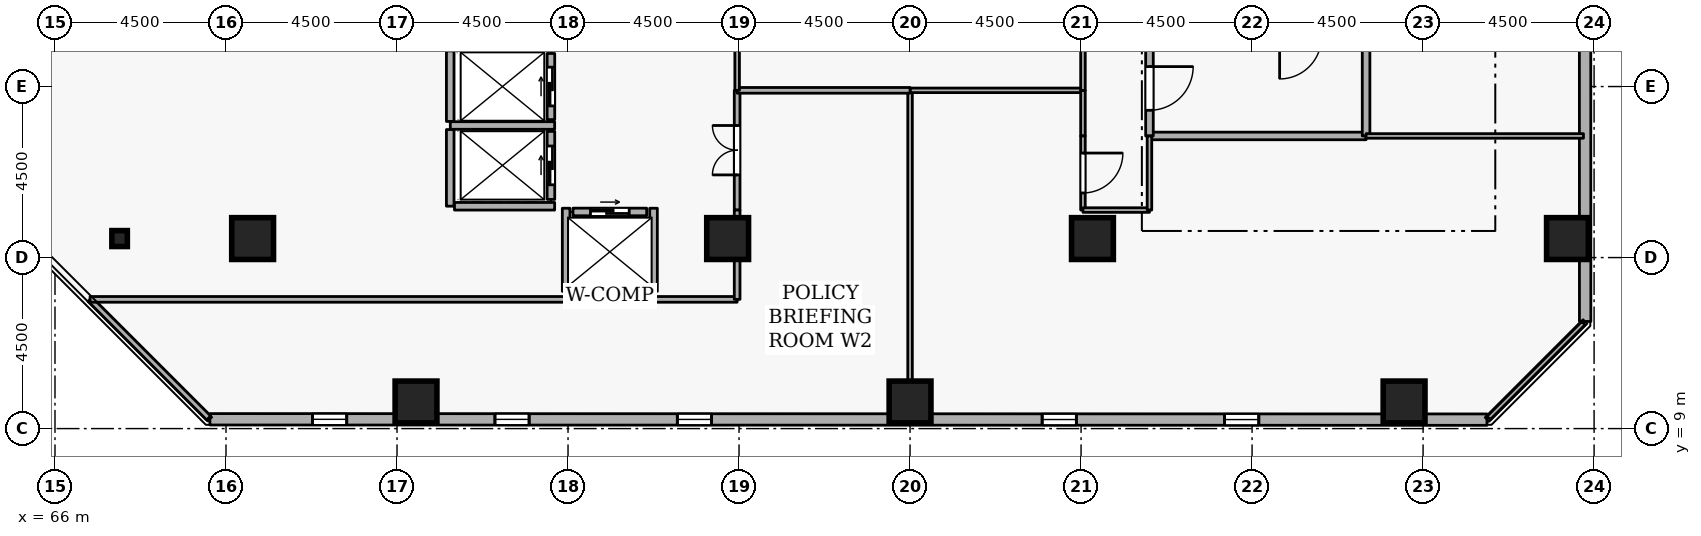
"""IFC4 building model, lengths in metres.
Left out: names, types, materials, properties, quantities, classifications, styles, units other than length and angle.
Written with IfcOpenShell. Run it as: python <this file> out.ifc"""

import sys

from ifc_helpers import new_model, si_unit, direction, frame, frame_2d, origin, origin_2d, place, context, subcontext, project, spatial, rectangle, i_section, extrude, element, fill, save


model = new_model("IFC4")
c1 = context("Model", 3, precision=1e-05, world=origin(), true_north=direction((0.0, 1.0)))
c2 = subcontext(c1, "Body", "Model", "MODEL_VIEW")
j1 = project(units=[si_unit("LENGTHUNIT", "METRE"), si_unit("PLANEANGLEUNIT", "RADIAN")], contexts=[c1])
p1 = place(None, origin())
s1 = spatial("IfcSite", under=j1, at=p1, CompositionType="ELEMENT")
p2 = place(p1, origin())
s2 = spatial("IfcBuilding", under=s1, at=p2, CompositionType="ELEMENT")
p3 = place(p2, frame((0.0, 0.0, 185.7)))
s3 = spatial("IfcBuildingStorey", under=s2, at=p3, CompositionType="ELEMENT", Elevation=185.7)
for number, where, z_axis, x_axis in (
    (1, (105.8, 14.0, 0.0), (0.0, 0.0, 1.0), (1.0, 0.0, 0.0)),
    (2, (71.2, 14.0, 0.0), (0.0, 0.0, 1.0), (1.0, 0.0, 0.0)),
    (3, (101.5, 9.7, 0.0), (0.0, 0.0, 1.0), (1.0, 0.0, 0.0)),
    (4, (88.5, 9.7, 0.0), (0.0, 0.0, 1.0), (1.0, 0.0, 0.0)),
    (5, (75.5, 9.7, 0.0), (0.0, 0.0, 1.0), (1.0, 0.0, 0.0)),
    (6, (93.3, 14.0, 0.0), (0.0, 0.0, 1.0), (1.0, 0.0, 0.0)),
    (7, (83.7, 14.0, 0.0), (0.0, 0.0, 1.0), (1.0, 0.0, 0.0)),
):
    element("IfcColumn", number, at=place(p3, frame(where, z_axis=z_axis, x_axis=x_axis)), inside=s3, PredefinedType="COLUMN", context=c2, shape_type="SweptSolid", body=[
        extrude(rectangle(XDim=1.1, YDim=1.1, at=origin_2d()), origin(), (0.0, 0.0, 1.0), 3.6),
    ])
p4 = place(p3, frame((67.7, 14.0, 0.0), z_axis=(0.0, 0.0, 1.0), x_axis=(1.0, 0.0, 0.0)))
e8 = element("IfcColumn", 8, at=p4, inside=s3, PredefinedType="COLUMN", context=c2, shape_type="SweptSolid", body=[
    extrude(i_section(OverallWidth=0.407, OverallDepth=0.419, WebThickness=0.031, FlangeThickness=0.049, FilletRadius=0.015, at=origin_2d()), origin(), (0.0, 0.0, 1.0), 3.6),
])
p5 = place(p3, frame((70.076, 9.244, 0.0), z_axis=(0.0, 0.0, 1.0), x_axis=(0.999999963872, -0.000268805477, 0.0)))
e9 = element("IfcWall", 9, at=p5, inside=s3, PredefinedType="STANDARD", context=c2, shape_type="SweptSolid", body=[
    extrude(rectangle(XDim=33.605, YDim=0.3, at=frame_2d((16.802, 0.0))), origin(), (0.0, 0.0, 1.0), 2.7),
])
p6 = place(p5, frame((2.7, 0.0, 0.72)))
e10 = element("IfcOpeningElement", 10, at=p6, cuts=e9, PredefinedType="OPENING", context=c2, shape_type="SweptSolid", body=[
    extrude(rectangle(XDim=0.9, YDim=1.75, at=frame_2d((0.45, 0.875))), frame((0.0, 0.16, 0.0), z_axis=(0.0, -1.0, 0.0), x_axis=(1.0, 0.0, 0.0)), (0.0, 0.0, 1.0), 0.32),
])
p7 = place(p5, frame((7.5, 0.0, 0.72)))
e11 = element("IfcOpeningElement", 11, at=p7, cuts=e9, PredefinedType="OPENING", context=c2, shape_type="SweptSolid", body=[
    extrude(rectangle(XDim=0.9, YDim=1.75, at=frame_2d((0.45, 0.875))), frame((0.0, 0.16, 0.0), z_axis=(0.0, -1.0, 0.0), x_axis=(1.0, 0.0, 0.0)), (0.0, 0.0, 1.0), 0.32),
])
p8 = place(p5, frame((12.3, 0.0, 0.72)))
e12 = element("IfcOpeningElement", 12, at=p8, cuts=e9, PredefinedType="OPENING", context=c2, shape_type="SweptSolid", body=[
    extrude(rectangle(XDim=0.9, YDim=1.75, at=frame_2d((0.45, 0.875))), frame((0.0, 0.16, 0.0), z_axis=(0.0, -1.0, 0.0), x_axis=(1.0, 0.0, 0.0)), (0.0, 0.0, 1.0), 0.32),
])
p9 = place(p5, frame((21.9, 0.0, 0.72)))
e13 = element("IfcOpeningElement", 13, at=p9, cuts=e9, PredefinedType="OPENING", context=c2, shape_type="SweptSolid", body=[
    extrude(rectangle(XDim=0.9, YDim=1.75, at=frame_2d((0.45, 0.875))), frame((0.0, 0.16, 0.0), z_axis=(0.0, -1.0, 0.0), x_axis=(1.0, 0.0, 0.0)), (0.0, 0.0, 1.0), 0.32),
])
p10 = place(p5, frame((26.7, 0.0, 0.72)))
e14 = element("IfcOpeningElement", 14, at=p10, cuts=e9, PredefinedType="OPENING", context=c2, shape_type="SweptSolid", body=[
    extrude(rectangle(XDim=0.9, YDim=1.75, at=frame_2d((0.45, 0.875))), frame((0.0, 0.16, 0.0), z_axis=(0.0, -1.0, 0.0), x_axis=(1.0, 0.0, 0.0)), (0.0, 0.0, 1.0), 0.32),
])
p11 = place(p3, frame((106.265, 11.819, 0.0), z_axis=(0.0, 0.0, 1.0), x_axis=(-0.000268805477, 0.999999963872, 0.0)))
e15 = element("IfcWall", 15, at=p11, inside=s3, PredefinedType="STANDARD", context=c2, shape_type="SweptSolid", body=[
    extrude(rectangle(XDim=33.605, YDim=0.3, at=frame_2d((16.802, 0.0))), origin(), (0.0, 0.0, 1.0), 2.7),
])
p12 = place(p11, frame((7.5, 0.0, 0.72)))
e16 = element("IfcOpeningElement", 16, at=p12, cuts=e15, PredefinedType="OPENING", context=c2, shape_type="SweptSolid", body=[
    extrude(rectangle(XDim=0.9, YDim=1.75, at=frame_2d((0.45, 0.875))), frame((0.0, 0.16, 0.0), z_axis=(0.0, -1.0, 0.0), x_axis=(1.0, 0.0, 0.0)), (0.0, 0.0, 1.0), 0.32),
])
p13 = place(p11, frame((12.3, 0.0, 0.72)))
e17 = element("IfcOpeningElement", 17, at=p13, cuts=e15, PredefinedType="OPENING", context=c2, shape_type="SweptSolid", body=[
    extrude(rectangle(XDim=0.9, YDim=1.75, at=frame_2d((0.45, 0.875))), frame((0.0, 0.16, 0.0), z_axis=(0.0, -1.0, 0.0), x_axis=(1.0, 0.0, 0.0)), (0.0, 0.0, 1.0), 0.32),
])
p14 = place(p11, frame((17.1, 0.0, 0.72)))
e18 = element("IfcOpeningElement", 18, at=p14, cuts=e15, PredefinedType="OPENING", context=c2, shape_type="SweptSolid", body=[
    extrude(rectangle(XDim=0.9, YDim=1.75, at=frame_2d((0.45, 0.875))), frame((0.0, 0.16, 0.0), z_axis=(0.0, -1.0, 0.0), x_axis=(1.0, 0.0, 0.0)), (0.0, 0.0, 1.0), 0.32),
])
p15 = place(p11, frame((21.9, 0.0, 0.72)))
e19 = element("IfcOpeningElement", 19, at=p15, cuts=e15, PredefinedType="OPENING", context=c2, shape_type="SweptSolid", body=[
    extrude(rectangle(XDim=0.9, YDim=1.75, at=frame_2d((0.45, 0.875))), frame((0.0, 0.16, 0.0), z_axis=(0.0, -1.0, 0.0), x_axis=(1.0, 0.0, 0.0)), (0.0, 0.0, 1.0), 0.32),
])
p16 = place(p3, frame((79.05, 17.13, 0.0), z_axis=(0.0, 0.0, 1.0), x_axis=(0.0, 1.0, 0.0)))
e20 = element("IfcWall", 20, at=p16, inside=s3, PredefinedType="STANDARD", context=c2, shape_type="SweptSolid", body=[
    extrude(rectangle(XDim=1.74, YDim=0.2, at=frame_2d((0.87, 0.0))), origin(), (0.0, 0.0, 1.0), 3.34),
])
p17 = place(p16, frame((0.36, 0.0, 0.0)))
e21 = element("IfcOpeningElement", 21, at=p17, cuts=e20, PredefinedType="OPENING", context=c2, shape_type="SweptSolid", body=[
    extrude(rectangle(XDim=1.02, YDim=2.06, at=frame_2d((0.51, 1.03))), frame((0.0, 0.11, 0.0), z_axis=(0.0, -1.0, 0.0), x_axis=(1.0, 0.0, 0.0)), (0.0, 0.0, 1.0), 0.22),
])
p18 = place(p3, frame((79.05, 15.03, 0.0), z_axis=(0.0, 0.0, 1.0), x_axis=(0.0, 1.0, 0.0)))
e22 = element("IfcWall", 22, at=p18, inside=s3, PredefinedType="STANDARD", context=c2, shape_type="SweptSolid", body=[
    extrude(rectangle(XDim=1.79, YDim=0.2, at=frame_2d((0.895, 0.0))), origin(), (0.0, 0.0, 1.0), 3.34),
])
p19 = place(p18, frame((0.385, 0.0, 0.0)))
e23 = element("IfcOpeningElement", 23, at=p19, cuts=e22, PredefinedType="OPENING", context=c2, shape_type="SweptSolid", body=[
    extrude(rectangle(XDim=1.02, YDim=2.06, at=frame_2d((0.51, 1.03))), frame((0.0, 0.11, 0.0), z_axis=(0.0, -1.0, 0.0), x_axis=(1.0, 0.0, 0.0)), (0.0, 0.0, 1.0), 0.22),
])
p20 = place(p3, frame((79.63, 14.7, 0.0), z_axis=(0.0, 0.0, 1.0), x_axis=(1.0, 0.0, 0.0)))
e24 = element("IfcWall", 24, at=p20, inside=s3, PredefinedType="STANDARD", context=c2, shape_type="SweptSolid", body=[
    extrude(rectangle(XDim=1.94, YDim=0.2, at=frame_2d((0.97, 0.0))), origin(), (0.0, 0.0, 1.0), 3.34),
])
p21 = place(p20, frame((0.46, 0.0, 0.0)))
e25 = element("IfcOpeningElement", 25, at=p21, cuts=e24, PredefinedType="OPENING", context=c2, shape_type="SweptSolid", body=[
    extrude(rectangle(XDim=1.02, YDim=2.06, at=frame_2d((0.51, 1.03))), frame((0.0, 0.11, 0.0), z_axis=(0.0, -1.0, 0.0), x_axis=(1.0, 0.0, 0.0)), (0.0, 0.0, 1.0), 0.22),
])
p22 = place(p3, frame((76.402, 16.975, 0.0), z_axis=(0.0, 0.0, 1.0), x_axis=(1.0, 0.0, 0.0)))
e26 = element("IfcWall", 26, at=p22, inside=s3, PredefinedType="STANDARD", context=c2, shape_type="SweptSolid", body=[
    extrude(rectangle(XDim=2.746, YDim=0.2, at=frame_2d((1.373, 0.0))), origin(), (0.0, 0.0, 1.0), 3.34),
])
p23 = place(p3, frame((76.4, 14.852, 0.0), z_axis=(0.0, 0.0, 1.0), x_axis=(0.0, 1.0, 0.0)))
e27 = element("IfcWall", 27, at=p23, inside=s3, PredefinedType="STANDARD", context=c2, shape_type="SweptSolid", body=[
    extrude(rectangle(XDim=2.016, YDim=0.2, at=frame_2d((1.008, 0.0))), origin(), (0.0, 0.0, 1.0), 3.34),
])
p24 = place(p3, frame((76.4, 17.082, 0.0), z_axis=(0.0, 0.0, 1.0), x_axis=(0.0, 1.0, 0.0)))
e28 = element("IfcWall", 28, at=p24, inside=s3, PredefinedType="STANDARD", context=c2, shape_type="SweptSolid", body=[
    extrude(rectangle(XDim=1.856, YDim=0.2, at=frame_2d((0.928, 0.0))), origin(), (0.0, 0.0, 1.0), 3.34),
])
p25 = place(p3, frame((76.512, 14.85, 0.0), z_axis=(0.0, 0.0, 1.0), x_axis=(1.0, 0.0, 0.0)))
e29 = element("IfcWall", 29, at=p25, inside=s3, PredefinedType="STANDARD", context=c2, shape_type="SweptSolid", body=[
    extrude(rectangle(XDim=2.636, YDim=0.2, at=frame_2d((1.318, 0.0))), origin(), (0.0, 0.0, 1.0), 3.34),
])
p26 = place(p3, frame((79.452, 12.5, 0.0), z_axis=(0.0, 0.0, 1.0), x_axis=(1.0, 0.0, 0.0)))
e30 = element("IfcWall", 30, at=p26, inside=s3, PredefinedType="STANDARD", context=c2, shape_type="SweptSolid", body=[
    extrude(rectangle(XDim=2.296, YDim=0.2, at=frame_2d((1.148, 0.0))), origin(), (0.0, 0.0, 1.0), 3.34),
])
for number, where, z_axis, x_axis in (
    (31, (81.75, 12.612, 0.0), (0.0, 0.0, 1.0), (0.0, 1.0, 0.0)),
    (32, (79.45, 12.612, 0.0), (0.0, 0.0, 1.0), (0.0, 1.0, 0.0)),
):
    element("IfcWall", number, at=place(p3, frame(where, z_axis=z_axis, x_axis=x_axis)), inside=s3, PredefinedType="STANDARD", context=c2, shape_type="SweptSolid", body=[
        extrude(rectangle(XDim=2.186, YDim=0.2, at=frame_2d((1.093, 0.0))), origin(), (0.0, 0.0, 1.0), 3.34),
    ])
p27 = place(p3, frame((94.8, 16.7, 0.0), z_axis=(0.0, 0.0, 1.0), x_axis=(1.0, 0.0, 0.0)))
e33 = element("IfcWall", 33, at=p27, inside=s3, PredefinedType="STANDARD", context=c2, shape_type="SweptSolid", body=[
    extrude(rectangle(XDim=5.7, YDim=0.2, at=frame_2d((2.85, 0.0))), origin(), (0.0, 0.0, 1.0), 3.34),
])
p28 = place(p3, frame((100.5, 16.7, 0.0), z_axis=(0.0, 0.0, 1.0), x_axis=(0.0, 1.0, 0.0)))
e34 = element("IfcWall", 34, at=p28, inside=s3, PredefinedType="STANDARD", context=c2, shape_type="SweptSolid", body=[
    extrude(rectangle(XDim=2.5, YDim=0.2, at=frame_2d((1.25, 0.0))), origin(), (0.0, 0.0, 1.0), 3.34),
])
p29 = place(p3, frame((94.8, 19.2, 0.0), z_axis=(0.0, 0.0, 1.0), x_axis=(0.0, -1.0, 0.0)))
e35 = element("IfcWall", 35, at=p29, inside=s3, PredefinedType="STANDARD", context=c2, shape_type="SweptSolid", body=[
    extrude(rectangle(XDim=2.5, YDim=0.2, at=frame_2d((1.25, 0.0))), origin(), (0.0, 0.0, 1.0), 3.34),
])
p30 = place(p29, frame((0.675, 0.0, 0.0)))
e36 = element("IfcOpeningElement", 36, at=p30, cuts=e35, PredefinedType="OPENING", context=c2, shape_type="SweptSolid", body=[
    extrude(rectangle(XDim=1.15, YDim=2.1, at=frame_2d((0.575, 1.05))), frame((0.0, 0.11, 0.0), z_axis=(0.0, -1.0, 0.0), x_axis=(1.0, 0.0, 0.0)), (0.0, 0.0, 1.0), 0.22),
])
p31 = place(p3, frame((88.5, 9.28, 0.0), z_axis=(0.0, 0.0, 1.0), x_axis=(0.0, 1.0, 0.0)))
e37 = element("IfcWall", 37, at=p31, inside=s3, PredefinedType="PARTITIONING", context=c2, shape_type="SweptSolid", body=[
    extrude(rectangle(XDim=8.62, YDim=0.12, at=frame_2d((4.31, 0.0))), origin(), (0.0, 0.0, 1.0), 2.878),
])
p32 = place(p3, frame((88.5, 17.9, 0.0), z_axis=(0.0, 0.0, 1.0), x_axis=(1.0, 0.0, 0.0)))
e38 = element("IfcWall", 38, at=p32, inside=s3, PredefinedType="PARTITIONING", context=c2, shape_type="SweptSolid", body=[
    extrude(rectangle(XDim=4.55, YDim=0.12, at=frame_2d((2.275, 0.0))), origin(), (0.0, 0.0, 1.0), 3.34),
])
p33 = place(p3, frame((93.05, 17.9, 0.0), z_axis=(0.0, 0.0, 1.0), x_axis=(0.0, -1.0, 0.0)))
e39 = element("IfcWall", 39, at=p33, inside=s3, PredefinedType="PARTITIONING", context=c2, shape_type="SweptSolid", body=[
    extrude(rectangle(XDim=1.2, YDim=0.12, at=frame_2d((0.6, 0.0))), origin(), (0.0, 0.0, 1.0), 3.34),
])
p34 = place(p3, frame((93.05, 16.7, 0.0), z_axis=(0.0, 0.0, 1.0), x_axis=(0.0, -1.0, 0.0)))
e40 = element("IfcWall", 40, at=p34, inside=s3, PredefinedType="PARTITIONING", context=c2, shape_type="SweptSolid", body=[
    extrude(rectangle(XDim=1.95, YDim=0.12, at=frame_2d((0.975, 0.0))), origin(), (0.0, 0.0, 1.0), 3.34),
])
p35 = place(p34, frame((0.45, 0.0, 0.0)))
e41 = element("IfcOpeningElement", 41, at=p35, cuts=e40, PredefinedType="OPENING", context=c2, shape_type="SweptSolid", body=[
    extrude(rectangle(XDim=1.05, YDim=2.1, at=frame_2d((0.525, 1.05))), frame((0.0, 0.07, 0.0), z_axis=(0.0, -1.0, 0.0), x_axis=(1.0, 0.0, 0.0)), (0.0, 0.0, 1.0), 0.14),
])
p36 = place(p3, frame((93.05, 14.75, 0.0), z_axis=(0.0, 0.0, 1.0), x_axis=(1.0, 0.0, 0.0)))
e42 = element("IfcWall", 42, at=p36, inside=s3, PredefinedType="PARTITIONING", context=c2, shape_type="SweptSolid", body=[
    extrude(rectangle(XDim=1.75, YDim=0.12, at=frame_2d((0.875, 0.0))), origin(), (0.0, 0.0, 1.0), 3.34),
])
p37 = place(p3, frame((94.8, 14.75, 0.0), z_axis=(0.0, 0.0, 1.0), x_axis=(0.0, 1.0, 0.0)))
e43 = element("IfcWall", 43, at=p37, inside=s3, PredefinedType="PARTITIONING", context=c2, shape_type="SweptSolid", body=[
    extrude(rectangle(XDim=1.95, YDim=0.12, at=frame_2d((0.975, 0.0))), origin(), (0.0, 0.0, 1.0), 3.34),
])
p38 = place(p3, frame((100.5, 16.7, 0.0), z_axis=(0.0, 0.0, 1.0), x_axis=(1.0, 0.0, 0.0)))
e44 = element("IfcWall", 44, at=p38, inside=s3, PredefinedType="PARTITIONING", context=c2, shape_type="SweptSolid", body=[
    extrude(rectangle(XDim=5.72, YDim=0.12, at=frame_2d((2.86, 0.0))), origin(), (0.0, 0.0, 1.0), 3.34),
])
p39 = place(p3, frame((106.22, 11.775, 0.0), z_axis=(0.0, 0.0, 1.0), x_axis=(-0.707106781187, -0.707106781187, 0.0)))
e45 = element("IfcWall", 45, at=p39, inside=s3, PredefinedType="PARTITIONING", context=c2, shape_type="SweptSolid", body=[
    extrude(rectangle(XDim=3.528, YDim=0.12, at=frame_2d((1.764, 0.0))), origin(), (0.0, 0.0, 1.0), 3.34),
])
p40 = place(p3, frame((83.95, 14.75, 0.0), z_axis=(0.0, 0.0, 1.0), x_axis=(0.0, 1.0, 0.0)))
e46 = element("IfcWall", 46, at=p40, inside=s3, PredefinedType="PARTITIONING", context=c2, shape_type="SweptSolid", body=[
    extrude(rectangle(XDim=3.15, YDim=0.15, at=frame_2d((1.575, 0.0))), origin(), (0.0, 0.0, 1.0), 3.34),
])
p41 = place(p40, frame((0.925, 0.0, 0.0)))
e47 = element("IfcOpeningElement", 47, at=p41, cuts=e46, PredefinedType="OPENING", context=c2, shape_type="SweptSolid", body=[
    extrude(rectangle(XDim=1.3, YDim=2.12, at=frame_2d((0.65, 1.06))), frame((0.0, 0.085, 0.0), z_axis=(0.0, -1.0, 0.0), x_axis=(1.0, 0.0, 0.0)), (0.0, 0.0, 1.0), 0.17),
])
p42 = place(p3, frame((83.95, 17.9, 0.0), z_axis=(0.0, 0.0, 1.0), x_axis=(1.0, 0.0, 0.0)))
e48 = element("IfcWall", 48, at=p42, inside=s3, PredefinedType="PARTITIONING", context=c2, shape_type="SweptSolid", body=[
    extrude(rectangle(XDim=4.55, YDim=0.15, at=frame_2d((2.275, 0.0))), origin(), (0.0, 0.0, 1.0), 3.34),
])
p43 = place(p3, frame((70.044, 9.28, 0.0), z_axis=(0.0, 0.0, 1.0), x_axis=(-0.707134446312, 0.707079114978, 0.0)))
e49 = element("IfcWall", 49, at=p43, inside=s3, PredefinedType="PARTITIONING", context=c2, shape_type="SweptSolid", body=[
    extrude(rectangle(XDim=4.412, YDim=0.15, at=frame_2d((2.206, 0.0))), origin(), (0.0, 0.0, 1.0), 3.34),
])
p44 = place(p3, frame((66.924, 12.4, 0.0), z_axis=(0.0, 0.0, 1.0), x_axis=(1.0, 0.0, 0.0)))
e50 = element("IfcWall", 50, at=p44, inside=s3, PredefinedType="PARTITIONING", context=c2, shape_type="SweptSolid", body=[
    extrude(rectangle(XDim=12.528, YDim=0.15, at=frame_2d((6.264, 0.0))), origin(), (0.0, 0.0, 1.0), 3.34),
])
p45 = place(p3, frame((81.748, 12.4, 0.0), z_axis=(0.0, 0.0, 1.0), x_axis=(1.0, 0.0, 0.0)))
e51 = element("IfcWall", 51, at=p45, inside=s3, PredefinedType="PARTITIONING", context=c2, shape_type="SweptSolid", body=[
    extrude(rectangle(XDim=2.202, YDim=0.15, at=frame_2d((1.101, 0.0))), origin(), (0.0, 0.0, 1.0), 3.34),
])
p46 = place(p3, frame((83.95, 12.4, 0.0), z_axis=(0.0, 0.0, 1.0), x_axis=(0.0, 1.0, 0.0)))
e52 = element("IfcWall", 52, at=p46, inside=s3, PredefinedType="PARTITIONING", context=c2, shape_type="SweptSolid", body=[
    extrude(rectangle(XDim=2.35, YDim=0.15, at=frame_2d((1.175, 0.0))), origin(), (0.0, 0.0, 1.0), 3.34),
])
p47 = place(p3, frame((83.95, 17.9, 0.0), z_axis=(0.0, 0.0, 1.0), x_axis=(0.0, 1.0, 0.0)))
e53 = element("IfcWall", 53, at=p47, inside=s3, PredefinedType="PARTITIONING", context=c2, shape_type="SweptSolid", body=[
    extrude(rectangle(XDim=4.5, YDim=0.12, at=frame_2d((2.25, 0.0))), origin(), (0.0, 0.0, 1.0), 3.34),
])
p48 = place(p47, frame((1.775, 0.0, 0.0)))
e54 = element("IfcOpeningElement", 54, at=p48, cuts=e53, PredefinedType="OPENING", context=c2, shape_type="SweptSolid", body=[
    extrude(rectangle(XDim=0.95, YDim=2.1, at=frame_2d((0.475, 1.05))), frame((0.0, 0.07, 0.0), z_axis=(0.0, -1.0, 0.0), x_axis=(1.0, 0.0, 0.0)), (0.0, 0.0, 1.0), 0.14),
])
p49 = place(p3, frame((93.05, 22.4, 0.0), z_axis=(0.0, 0.0, 1.0), x_axis=(0.0, -1.0, 0.0)))
e55 = element("IfcWall", 55, at=p49, inside=s3, PredefinedType="PARTITIONING", context=c2, shape_type="SweptSolid", body=[
    extrude(rectangle(XDim=4.5, YDim=0.12, at=frame_2d((2.25, 0.0))), origin(), (0.0, 0.0, 1.0), 3.34),
])
p50 = place(p6, origin())
e56 = element("IfcWindow", 56, at=p50, inside=s3, PartitioningType="SINGLE_PANEL", PredefinedType="WINDOW", context=c2, shape_type="SweptSolid", body=[
    extrude(rectangle(XDim=0.9, YDim=1.75, at=frame_2d((0.45, 0.875))), frame((0.0, 0.03, 0.0), z_axis=(0.0, -1.0, 0.0), x_axis=(1.0, 0.0, 0.0)), (0.0, 0.0, 1.0), 0.06),
])
fill(e10, e56)
p51 = place(p7, origin())
e57 = element("IfcWindow", 57, at=p51, inside=s3, PartitioningType="SINGLE_PANEL", PredefinedType="WINDOW", context=c2, shape_type="SweptSolid", body=[
    extrude(rectangle(XDim=0.9, YDim=1.75, at=frame_2d((0.45, 0.875))), frame((0.0, 0.03, 0.0), z_axis=(0.0, -1.0, 0.0), x_axis=(1.0, 0.0, 0.0)), (0.0, 0.0, 1.0), 0.06),
])
fill(e11, e57)
p52 = place(p8, origin())
e58 = element("IfcWindow", 58, at=p52, inside=s3, PartitioningType="SINGLE_PANEL", PredefinedType="WINDOW", context=c2, shape_type="SweptSolid", body=[
    extrude(rectangle(XDim=0.9, YDim=1.75, at=frame_2d((0.45, 0.875))), frame((0.0, 0.03, 0.0), z_axis=(0.0, -1.0, 0.0), x_axis=(1.0, 0.0, 0.0)), (0.0, 0.0, 1.0), 0.06),
])
fill(e12, e58)
p53 = place(p9, origin())
e59 = element("IfcWindow", 59, at=p53, inside=s3, PartitioningType="SINGLE_PANEL", PredefinedType="WINDOW", context=c2, shape_type="SweptSolid", body=[
    extrude(rectangle(XDim=0.9, YDim=1.75, at=frame_2d((0.45, 0.875))), frame((0.0, 0.03, 0.0), z_axis=(0.0, -1.0, 0.0), x_axis=(1.0, 0.0, 0.0)), (0.0, 0.0, 1.0), 0.06),
])
fill(e13, e59)
p54 = place(p10, origin())
e60 = element("IfcWindow", 60, at=p54, inside=s3, PartitioningType="SINGLE_PANEL", PredefinedType="WINDOW", context=c2, shape_type="SweptSolid", body=[
    extrude(rectangle(XDim=0.9, YDim=1.75, at=frame_2d((0.45, 0.875))), frame((0.0, 0.03, 0.0), z_axis=(0.0, -1.0, 0.0), x_axis=(1.0, 0.0, 0.0)), (0.0, 0.0, 1.0), 0.06),
])
fill(e14, e60)
p55 = place(p17, origin())
e61 = element("IfcDoor", 61, at=p55, inside=s3, OperationType="SLIDING_TO_LEFT", PredefinedType="DOOR", context=c2, shape_type="SweptSolid", body=[
    extrude(rectangle(XDim=1.02, YDim=2.06, at=frame_2d((0.51, 1.03))), frame((0.0, 0.025, 0.0), z_axis=(0.0, -1.0, 0.0), x_axis=(1.0, 0.0, 0.0)), (0.0, 0.0, 1.0), 0.05),
])
fill(e21, e61)
p56 = place(p19, origin())
e62 = element("IfcDoor", 62, at=p56, inside=s3, OperationType="SLIDING_TO_LEFT", PredefinedType="DOOR", context=c2, shape_type="SweptSolid", body=[
    extrude(rectangle(XDim=1.02, YDim=2.06, at=frame_2d((0.51, 1.03))), frame((0.0, 0.025, 0.0), z_axis=(0.0, -1.0, 0.0), x_axis=(1.0, 0.0, 0.0)), (0.0, 0.0, 1.0), 0.05),
])
fill(e23, e62)
p57 = place(p21, origin())
e63 = element("IfcDoor", 63, at=p57, inside=s3, OperationType="SLIDING_TO_LEFT", PredefinedType="DOOR", context=c2, shape_type="SweptSolid", body=[
    extrude(rectangle(XDim=1.02, YDim=2.06, at=frame_2d((0.51, 1.03))), frame((0.0, 0.025, 0.0), z_axis=(0.0, -1.0, 0.0), x_axis=(1.0, 0.0, 0.0)), (0.0, 0.0, 1.0), 0.05),
])
fill(e25, e63)
p58 = place(p30, origin())
e64 = element("IfcDoor", 64, at=p58, inside=s3, OperationType="SINGLE_SWING_LEFT", PredefinedType="DOOR", context=c2, shape_type="SweptSolid", body=[
    extrude(rectangle(XDim=1.15, YDim=2.1, at=frame_2d((0.575, 1.05))), frame((0.0, 0.025, 0.0), z_axis=(0.0, -1.0, 0.0), x_axis=(1.0, 0.0, 0.0)), (0.0, 0.0, 1.0), 0.05),
])
fill(e36, e64)
p59 = place(p35, origin())
e65 = element("IfcDoor", 65, at=p59, inside=s3, OperationType="SINGLE_SWING_LEFT", PredefinedType="DOOR", context=c2, shape_type="SweptSolid", body=[
    extrude(rectangle(XDim=1.05, YDim=2.1, at=frame_2d((0.525, 1.05))), frame((0.0, 0.025, 0.0), z_axis=(0.0, -1.0, 0.0), x_axis=(1.0, 0.0, 0.0)), (0.0, 0.0, 1.0), 0.05),
])
fill(e41, e65)
p60 = place(p41, origin())
e66 = element("IfcDoor", 66, at=p60, inside=s3, OperationType="DOUBLE_DOOR_SINGLE_SWING", PredefinedType="DOOR", context=c2, shape_type="SweptSolid", body=[
    extrude(rectangle(XDim=1.3, YDim=2.12, at=frame_2d((0.65, 1.06))), frame((0.0, 0.025, 0.0), z_axis=(0.0, -1.0, 0.0), x_axis=(1.0, 0.0, 0.0)), (0.0, 0.0, 1.0), 0.05),
])
fill(e47, e66)
save(model, sys.argv[1])
